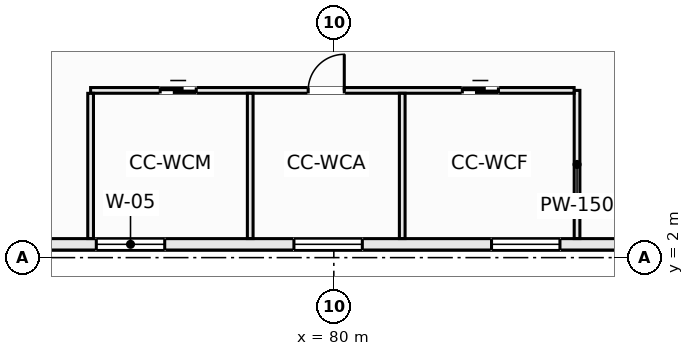
"""IFC4 building model, lengths in metres.
Left out: names, types, materials, properties, quantities, classifications, styles, units other than length and angle.
Written with IfcOpenShell. Run it as: python <this file> out.ifc"""

import sys

from ifc_helpers import new_model, si_unit, direction, frame, frame_2d, origin, place, context, subcontext, project, spatial, rectangle, extrude, element, fill, save


model = new_model("IFC4")
c1 = context("Model", 3, precision=1e-05, world=origin(), true_north=direction((0.0, 1.0)))
c2 = subcontext(c1, "Body", "Model", "MODEL_VIEW")
j1 = project(units=[si_unit("LENGTHUNIT", "METRE"), si_unit("PLANEANGLEUNIT", "RADIAN")], contexts=[c1])
p1 = place(None, origin())
s1 = spatial("IfcSite", under=j1, at=p1, CompositionType="ELEMENT")
p2 = place(p1, origin())
s2 = spatial("IfcBuilding", under=s1, at=p2, CompositionType="ELEMENT")
p3 = place(p2, frame((0.0, 0.0, 5.0)))
s3 = spatial("IfcBuildingStorey", under=s2, at=p3, CompositionType="ELEMENT", Elevation=5.0)
p4 = place(p3, frame((62.35, 2.35, 0.0), z_axis=(0.0, 0.0, 1.0), x_axis=(1.0, 0.0, 0.0)))
e1 = element("IfcWall", 1, at=p4, inside=s3, PredefinedType="SOLIDWALL", context=c2, shape_type="SweptSolid", body=[
    extrude(rectangle(XDim=35.3, YDim=0.3, at=frame_2d((17.65, 0.0))), origin(), (0.0, 0.0, 1.0), 4.74),
])
p5 = place(p4, frame((11.4, 0.0, 0.9)))
e2 = element("IfcOpeningElement", 2, at=p5, cuts=e1, PredefinedType="OPENING", context=c2, shape_type="SweptSolid", body=[
    extrude(rectangle(XDim=1.8, YDim=1.65, at=frame_2d((0.9, 0.825))), frame((0.0, 0.16, 0.0), z_axis=(0.0, -1.0, 0.0), x_axis=(1.0, 0.0, 0.0)), (0.0, 0.0, 1.0), 0.32),
])
p6 = place(p4, frame((16.6, 0.0, 0.9)))
e3 = element("IfcOpeningElement", 3, at=p6, cuts=e1, PredefinedType="OPENING", context=c2, shape_type="SweptSolid", body=[
    extrude(rectangle(XDim=1.8, YDim=1.65, at=frame_2d((0.9, 0.825))), frame((0.0, 0.16, 0.0), z_axis=(0.0, -1.0, 0.0), x_axis=(1.0, 0.0, 0.0)), (0.0, 0.0, 1.0), 0.32),
])
p7 = place(p4, frame((21.8, 0.0, 0.9)))
e4 = element("IfcOpeningElement", 4, at=p7, cuts=e1, PredefinedType="OPENING", context=c2, shape_type="SweptSolid", body=[
    extrude(rectangle(XDim=1.8, YDim=1.65, at=frame_2d((0.9, 0.825))), frame((0.0, 0.16, 0.0), z_axis=(0.0, -1.0, 0.0), x_axis=(1.0, 0.0, 0.0)), (0.0, 0.0, 1.0), 0.32),
])
p8 = place(p3, frame((86.4, 2.502, 0.0), z_axis=(0.0, 0.0, 1.0), x_axis=(0.0, 1.0, 0.0)))
e5 = element("IfcWall", 5, at=p8, inside=s3, PredefinedType="PARTITIONING", context=c2, shape_type="SweptSolid", body=[
    extrude(rectangle(XDim=3.898, YDim=0.15, at=frame_2d((1.949, 0.0))), origin(), (0.0, 0.0, 1.0), 4.74),
])
p9 = place(p3, frame((73.6, 6.4, 0.0), z_axis=(0.0, 0.0, 1.0), x_axis=(1.0, 0.0, 0.0)))
e6 = element("IfcWall", 6, at=p9, inside=s3, PredefinedType="PARTITIONING", context=c2, shape_type="SweptSolid", body=[
    extrude(rectangle(XDim=12.723, YDim=0.15, at=frame_2d((6.361, 0.0))), origin(), (0.0, 0.0, 1.0), 4.74),
])
p10 = place(p9, frame((1.83, 0.0, 0.0)))
e7 = element("IfcOpeningElement", 7, at=p10, cuts=e6, PredefinedType="OPENING", context=c2, shape_type="SweptSolid", body=[
    extrude(rectangle(XDim=0.95, YDim=2.1, at=frame_2d((0.475, 1.05))), frame((0.0, 0.085, 0.0), z_axis=(0.0, -1.0, 0.0), x_axis=(1.0, 0.0, 0.0)), (0.0, 0.0, 1.0), 0.17),
])
p11 = place(p9, frame((5.725, 0.0, 0.0)))
e8 = element("IfcOpeningElement", 8, at=p11, cuts=e6, PredefinedType="OPENING", context=c2, shape_type="SweptSolid", body=[
    extrude(rectangle(XDim=0.95, YDim=2.1, at=frame_2d((0.475, 1.05))), frame((0.0, 0.085, 0.0), z_axis=(0.0, -1.0, 0.0), x_axis=(1.0, 0.0, 0.0)), (0.0, 0.0, 1.0), 0.17),
])
p12 = place(p9, frame((9.781, 0.0, 0.0)))
e9 = element("IfcOpeningElement", 9, at=p12, cuts=e6, PredefinedType="OPENING", context=c2, shape_type="SweptSolid", body=[
    extrude(rectangle(XDim=0.95, YDim=2.1, at=frame_2d((0.475, 1.05))), frame((0.0, 0.085, 0.0), z_axis=(0.0, -1.0, 0.0), x_axis=(1.0, 0.0, 0.0)), (0.0, 0.0, 1.0), 0.17),
])
for number, where, z_axis, x_axis in (
    (10, (73.6, 2.502, 0.0), (0.0, 0.0, 1.0), (0.0, 1.0, 0.0)),
    (11, (77.8, 2.502, 0.0), (0.0, 0.0, 1.0), (0.0, 1.0, 0.0)),
    (12, (81.8, 2.502, 0.0), (0.0, 0.0, 1.0), (0.0, 1.0, 0.0)),
):
    element("IfcWall", number, at=place(p3, frame(where, z_axis=z_axis, x_axis=x_axis)), inside=s3, PredefinedType="PARTITIONING", context=c2, shape_type="SweptSolid", body=[
        extrude(rectangle(XDim=3.821, YDim=0.15, at=frame_2d((1.911, 0.0))), origin(), (0.0, 0.0, 1.0), 4.74),
    ])
p13 = place(p5, origin())
e13 = element("IfcWindow", 13, at=p13, inside=s3, PartitioningType="SINGLE_PANEL", PredefinedType="WINDOW", context=c2, shape_type="SweptSolid", body=[
    extrude(rectangle(XDim=1.8, YDim=1.65, at=frame_2d((0.9, 0.825))), frame((0.0, 0.03, 0.0), z_axis=(0.0, -1.0, 0.0), x_axis=(1.0, 0.0, 0.0)), (0.0, 0.0, 1.0), 0.06),
])
fill(e2, e13)
p14 = place(p6, origin())
e14 = element("IfcWindow", 14, at=p14, inside=s3, PartitioningType="SINGLE_PANEL", PredefinedType="WINDOW", context=c2, shape_type="SweptSolid", body=[
    extrude(rectangle(XDim=1.8, YDim=1.65, at=frame_2d((0.9, 0.825))), frame((0.0, 0.03, 0.0), z_axis=(0.0, -1.0, 0.0), x_axis=(1.0, 0.0, 0.0)), (0.0, 0.0, 1.0), 0.06),
])
fill(e3, e14)
p15 = place(p7, origin())
e15 = element("IfcWindow", 15, at=p15, inside=s3, PartitioningType="SINGLE_PANEL", PredefinedType="WINDOW", context=c2, shape_type="SweptSolid", body=[
    extrude(rectangle(XDim=1.8, YDim=1.65, at=frame_2d((0.9, 0.825))), frame((0.0, 0.03, 0.0), z_axis=(0.0, -1.0, 0.0), x_axis=(1.0, 0.0, 0.0)), (0.0, 0.0, 1.0), 0.06),
])
fill(e4, e15)
p16 = place(p10, origin())
e16 = element("IfcDoor", 16, at=p16, inside=s3, OperationType="SINGLE_SWING_LEFT", PredefinedType="DOOR", context=c2, shape_type="SweptSolid", body=[
    extrude(rectangle(XDim=0.95, YDim=2.1, at=frame_2d((0.475, 1.05))), frame((0.0, 0.025, 0.0), z_axis=(0.0, -1.0, 0.0), x_axis=(1.0, 0.0, 0.0)), (0.0, 0.0, 1.0), 0.05),
])
fill(e7, e16)
p17 = place(p11, origin())
e17 = element("IfcDoor", 17, at=p17, inside=s3, OperationType="SINGLE_SWING_RIGHT", PredefinedType="DOOR", context=c2, shape_type="SweptSolid", body=[
    extrude(rectangle(XDim=0.95, YDim=2.1, at=frame_2d((0.475, 1.05))), frame((0.0, 0.025, 0.0), z_axis=(0.0, -1.0, 0.0), x_axis=(1.0, 0.0, 0.0)), (0.0, 0.0, 1.0), 0.05),
])
fill(e8, e17)
p18 = place(p12, origin())
e18 = element("IfcDoor", 18, at=p18, inside=s3, OperationType="SINGLE_SWING_LEFT", PredefinedType="DOOR", context=c2, shape_type="SweptSolid", body=[
    extrude(rectangle(XDim=0.95, YDim=2.1, at=frame_2d((0.475, 1.05))), frame((0.0, 0.025, 0.0), z_axis=(0.0, -1.0, 0.0), x_axis=(1.0, 0.0, 0.0)), (0.0, 0.0, 1.0), 0.05),
])
fill(e9, e18)
save(model, sys.argv[1])
